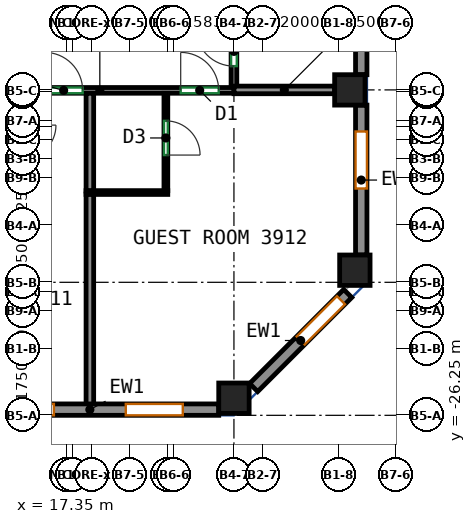
"""IFC4 building model, lengths in metres.
Left out: names, types, materials, properties, quantities, classifications, styles, units other than length and angle.
Written with IfcOpenShell. Run it as: python <this file> out.ifc"""

import sys

from ifc_helpers import new_model, si_unit, direction, frame, frame_2d, origin, origin_2d, place, context, subcontext, project, spatial, rectangle, extrude, source, transform, mapped, element, fill, save


model = new_model("IFC4")
c1 = context("Model", 3, precision=1e-05, world=origin(), true_north=direction((0.0, 1.0)))
c2 = subcontext(c1, "Body", "Model", "MODEL_VIEW")
j1 = project(units=[si_unit("LENGTHUNIT", "METRE"), si_unit("PLANEANGLEUNIT", "RADIAN")], contexts=[c1])
p1 = place(None, origin())
s1 = spatial("IfcSite", under=j1, at=p1, CompositionType="ELEMENT")
p2 = place(p1, origin())
s2 = spatial("IfcBuilding", under=s1, at=p2, CompositionType="ELEMENT")
p3 = place(p2, frame((0.0, 0.0, 168.5)))
s3 = spatial("IfcBuildingStorey", under=s2, at=p3, CompositionType="ELEMENT", Elevation=168.5)
m1 = source(origin(), c2, "Body", "SweptSolid", [
    extrude(rectangle(XDim=0.8, YDim=0.8, at=origin_2d()), origin(), (0.0, 0.0, 1.0), 3.12),
])
for number, where, z_axis, x_axis in (
    (1, (21.75, -25.8, 0.0), (0.0, 0.0, 1.0), (1.0, 0.0, 0.0)),
    (2, (24.8, -17.688, 0.0), (0.0, 0.0, 1.0), (1.0, 0.0, 0.0)),
    (3, (24.932, -22.432, 0.0), (0.0, 0.0, 1.0), (1.0, 0.0, 0.0)),
):
    element("IfcColumn", number, at=place(p3, frame(where, z_axis=z_axis, x_axis=x_axis)), inside=s3, PredefinedType="COLUMN", context=c2, shape_type="MappedRepresentation", body=[
        mapped(m1, transform((0.0, 0.0, 0.0))),
    ])
m2 = source(origin(), c2, "Body", "SweptSolid", [
    extrude(rectangle(XDim=6.783, YDim=0.3, at=frame_2d((3.392, 0.0))), origin(), (0.0, 0.0, 1.0), 3.12),
])
p4 = place(p3, frame((14.567, -26.1, 0.0), z_axis=(0.0, 0.0, 1.0), x_axis=(1.0, 0.0, 0.0)))
e4 = element("IfcWall", 4, at=p4, inside=s3, PredefinedType="SOLIDWALL", context=c2, shape_type="MappedRepresentation", body=[
    mapped(m2, transform((0.0, 0.0, 0.0))),
])
p5 = place(p4, frame((0.946, 0.0, 0.85)))
e5 = element("IfcOpeningElement", 5, at=p5, cuts=e4, PredefinedType="OPENING", context=c2, shape_type="SweptSolid", body=[
    extrude(rectangle(XDim=1.5, YDim=1.95, at=frame_2d((0.75, 0.975))), frame((0.0, 0.16, 0.0), z_axis=(0.0, -1.0, 0.0), x_axis=(1.0, 0.0, 0.0)), (0.0, 0.0, 1.0), 0.32),
])
p6 = place(p4, frame((4.337, 0.0, 0.85)))
e6 = element("IfcOpeningElement", 6, at=p6, cuts=e4, PredefinedType="OPENING", context=c2, shape_type="SweptSolid", body=[
    extrude(rectangle(XDim=1.5, YDim=1.95, at=frame_2d((0.75, 0.975))), frame((0.0, 0.16, 0.0), z_axis=(0.0, -1.0, 0.0), x_axis=(1.0, 0.0, 0.0)), (0.0, 0.0, 1.0), 0.32),
])
m3 = source(origin(), c2, "Body", "SweptSolid", [
    extrude(rectangle(XDim=3.5, YDim=0.3, at=frame_2d((1.75, 0.0))), origin(), (0.0, 0.0, 1.0), 3.12),
])
p7 = place(p3, frame((22.269, -25.519, 0.0), z_axis=(0.0, 0.0, 1.0), x_axis=(0.707141656123, 0.70707190453, 0.0)))
e7 = element("IfcWall", 7, at=p7, inside=s3, PredefinedType="SOLIDWALL", context=c2, shape_type="MappedRepresentation", body=[
    mapped(m3, transform((0.0, 0.0, 0.0))),
])
p8 = place(p7, frame((1.75, 0.0, 0.85)))
e8 = element("IfcOpeningElement", 8, at=p8, cuts=e7, PredefinedType="OPENING", context=c2, shape_type="SweptSolid", body=[
    extrude(rectangle(XDim=1.5, YDim=1.95, at=frame_2d((0.75, 0.975))), frame((0.0, 0.16, 0.0), z_axis=(0.0, -1.0, 0.0), x_axis=(1.0, 0.0, 0.0)), (0.0, 0.0, 1.0), 0.32),
])
m4 = source(origin(), c2, "Body", "SweptSolid", [
    extrude(rectangle(XDim=3.944, YDim=0.3, at=frame_2d((1.972, 0.0))), origin(), (0.0, 0.0, 1.0), 3.12),
])
p9 = place(p3, frame((25.1, -22.032, 0.0), z_axis=(0.0, 0.0, 1.0), x_axis=(0.0, 1.0, 0.0)))
e9 = element("IfcWall", 9, at=p9, inside=s3, PredefinedType="SOLIDWALL", context=c2, shape_type="MappedRepresentation", body=[
    mapped(m4, transform((0.0, 0.0, 0.0))),
])
p10 = place(p9, frame((1.75, 0.0, 0.85)))
e10 = element("IfcOpeningElement", 10, at=p10, cuts=e9, PredefinedType="OPENING", context=c2, shape_type="SweptSolid", body=[
    extrude(rectangle(XDim=1.5, YDim=1.95, at=frame_2d((0.75, 0.975))), frame((0.0, 0.16, 0.0), z_axis=(0.0, -1.0, 0.0), x_axis=(1.0, 0.0, 0.0)), (0.0, 0.0, 1.0), 0.32),
])
m5 = source(origin(), c2, "Body", "SweptSolid", [
    extrude(rectangle(XDim=7.763, YDim=0.3, at=frame_2d((3.881, 0.0))), origin(), (0.0, 0.0, 1.0), 3.12),
])
p11 = place(p3, frame((25.1, -17.288, 0.0), z_axis=(0.0, 0.0, 1.0), x_axis=(0.0, 1.0, 0.0)))
e11 = element("IfcWall", 11, at=p11, inside=s3, PredefinedType="SOLIDWALL", context=c2, shape_type="MappedRepresentation", body=[
    mapped(m5, transform((0.0, 0.0, 0.0))),
])
p12 = place(p11, frame((1.75, 0.0, 0.85)))
e12 = element("IfcOpeningElement", 12, at=p12, cuts=e11, PredefinedType="OPENING", context=c2, shape_type="SweptSolid", body=[
    extrude(rectangle(XDim=1.5, YDim=1.95, at=frame_2d((0.75, 0.975))), frame((0.0, 0.16, 0.0), z_axis=(0.0, -1.0, 0.0), x_axis=(1.0, 0.0, 0.0)), (0.0, 0.0, 1.0), 0.32),
])
p13 = place(p11, frame((5.631, 0.0, 0.85)))
e13 = element("IfcOpeningElement", 13, at=p13, cuts=e11, PredefinedType="OPENING", context=c2, shape_type="SweptSolid", body=[
    extrude(rectangle(XDim=1.5, YDim=1.95, at=frame_2d((0.75, 0.975))), frame((0.0, 0.16, 0.0), z_axis=(0.0, -1.0, 0.0), x_axis=(1.0, 0.0, 0.0)), (0.0, 0.0, 1.0), 0.32),
])
p14 = place(p3, frame((14.692, -17.7, 0.0), z_axis=(0.0, 0.0, 1.0), x_axis=(1.0, 0.0, 0.0)))
e14 = element("IfcWall", 14, at=p14, inside=s3, PredefinedType="PARTITIONING", context=c2, shape_type="SweptSolid", body=[
    extrude(rectangle(XDim=7.058, YDim=0.15, at=frame_2d((3.529, 0.0))), origin(), (0.0, 0.0, 1.0), 2.52),
])
p15 = place(p14, frame((2.077, 0.0, 0.0)))
e15 = element("IfcOpeningElement", 15, at=p15, cuts=e14, PredefinedType="OPENING", context=c2, shape_type="SweptSolid", body=[
    extrude(rectangle(XDim=1.0, YDim=2.1, at=frame_2d((0.5, 1.05))), frame((0.0, 0.085, 0.0), z_axis=(0.0, -1.0, 0.0), x_axis=(1.0, 0.0, 0.0)), (0.0, 0.0, 1.0), 0.17),
])
p16 = place(p14, frame((5.657, 0.0, 0.0)))
e16 = element("IfcOpeningElement", 16, at=p16, cuts=e14, PredefinedType="OPENING", context=c2, shape_type="SweptSolid", body=[
    extrude(rectangle(XDim=1.0, YDim=2.1, at=frame_2d((0.5, 1.05))), frame((0.0, 0.085, 0.0), z_axis=(0.0, -1.0, 0.0), x_axis=(1.0, 0.0, 0.0)), (0.0, 0.0, 1.0), 0.17),
])
p17 = place(p3, frame((21.75, -17.598, 0.0), z_axis=(0.0, 0.0, 1.0), x_axis=(0.0, 1.0, 0.0)))
e17 = element("IfcWall", 17, at=p17, inside=s3, PredefinedType="PARTITIONING", context=c2, shape_type="SweptSolid", body=[
    extrude(rectangle(XDim=1.848, YDim=0.15, at=frame_2d((0.924, 0.0))), origin(), (0.0, 0.0, 1.0), 3.12),
])
p18 = place(p17, frame((0.536, 0.0, 0.0)))
e18 = element("IfcOpeningElement", 18, at=p18, cuts=e17, PredefinedType="OPENING", context=c2, shape_type="SweptSolid", body=[
    extrude(rectangle(XDim=1.0, YDim=2.1, at=frame_2d((0.5, 1.05))), frame((0.0, 0.085, 0.0), z_axis=(0.0, -1.0, 0.0), x_axis=(1.0, 0.0, 0.0)), (0.0, 0.0, 1.0), 0.17),
])
p19 = place(p3, frame((17.959, -26.0, 0.0), z_axis=(0.0, 0.0, 1.0), x_axis=(0.0, 1.0, 0.0)))
e19 = element("IfcWall", 19, at=p19, inside=s3, PredefinedType="PARTITIONING", context=c2, shape_type="SweptSolid", body=[
    extrude(rectangle(XDim=5.572, YDim=0.2, at=frame_2d((2.786, 0.0))), origin(), (0.0, 0.0, 1.0), 3.12),
])
p20 = place(p3, frame((17.959, -20.348, 0.0), z_axis=(0.0, 0.0, 1.0), x_axis=(0.0, 1.0, 0.0)))
e20 = element("IfcWall", 20, at=p20, inside=s3, PredefinedType="PARTITIONING", context=c2, shape_type="SweptSolid", body=[
    extrude(rectangle(XDim=2.571, YDim=0.2, at=frame_2d((1.285, 0.0))), origin(), (0.0, 0.0, 1.0), 3.12),
])
p21 = place(p3, frame((17.859, -20.388, 0.0), z_axis=(0.0, 0.0, 1.0), x_axis=(1.0, 0.0, 0.0)))
e21 = element("IfcWall", 21, at=p21, inside=s3, PredefinedType="PARTITIONING", context=c2, shape_type="SweptSolid", body=[
    extrude(rectangle(XDim=2.15, YDim=0.1, at=frame_2d((1.075, 0.0))), origin(), (0.0, 0.0, 1.0), 3.12),
])
p22 = place(p3, frame((19.959, -17.777, 0.0), z_axis=(0.0, 0.0, 1.0), x_axis=(0.0, -1.0, 0.0)))
e22 = element("IfcWall", 22, at=p22, inside=s3, PredefinedType="PARTITIONING", context=c2, shape_type="SweptSolid", body=[
    extrude(rectangle(XDim=2.561, YDim=0.1, at=frame_2d((1.28, 0.0))), origin(), (0.0, 0.0, 1.0), 3.12),
])
p23 = place(p22, frame((0.725, 0.0, 0.0)))
e23 = element("IfcOpeningElement", 23, at=p23, cuts=e22, PredefinedType="OPENING", context=c2, shape_type="SweptSolid", body=[
    extrude(rectangle(XDim=0.9, YDim=2.1, at=frame_2d((0.45, 1.05))), frame((0.0, 0.06, 0.0), z_axis=(0.0, -1.0, 0.0), x_axis=(1.0, 0.0, 0.0)), (0.0, 0.0, 1.0), 0.12),
])
p24 = place(p3, frame((21.752, -17.688, 0.0), z_axis=(0.0, 0.0, 1.0), x_axis=(1.0, 0.0, 0.0)))
e24 = element("IfcWall", 24, at=p24, inside=s3, PredefinedType="PARTITIONING", context=c2, shape_type="SweptSolid", body=[
    extrude(rectangle(XDim=2.648, YDim=0.2, at=frame_2d((1.324, 0.0))), origin(), (0.0, 0.0, 1.0), 2.52),
])
p25 = place(p5, origin())
e25 = element("IfcWindow", 25, at=p25, inside=s3, PartitioningType="SINGLE_PANEL", PredefinedType="WINDOW", context=c2, shape_type="SweptSolid", body=[
    extrude(rectangle(XDim=1.5, YDim=1.95, at=frame_2d((0.75, 0.975))), frame((0.0, 0.03, 0.0), z_axis=(0.0, -1.0, 0.0), x_axis=(1.0, 0.0, 0.0)), (0.0, 0.0, 1.0), 0.06),
])
fill(e5, e25)
p26 = place(p6, origin())
e26 = element("IfcWindow", 26, at=p26, inside=s3, PartitioningType="SINGLE_PANEL", PredefinedType="WINDOW", context=c2, shape_type="SweptSolid", body=[
    extrude(rectangle(XDim=1.5, YDim=1.95, at=frame_2d((0.75, 0.975))), frame((0.0, 0.03, 0.0), z_axis=(0.0, -1.0, 0.0), x_axis=(1.0, 0.0, 0.0)), (0.0, 0.0, 1.0), 0.06),
])
fill(e6, e26)
p27 = place(p8, origin())
e27 = element("IfcWindow", 27, at=p27, inside=s3, PartitioningType="SINGLE_PANEL", PredefinedType="WINDOW", context=c2, shape_type="SweptSolid", body=[
    extrude(rectangle(XDim=1.5, YDim=1.95, at=frame_2d((0.75, 0.975))), frame((0.0, 0.03, 0.0), z_axis=(0.0, -1.0, 0.0), x_axis=(1.0, 0.0, 0.0)), (0.0, 0.0, 1.0), 0.06),
])
fill(e8, e27)
p28 = place(p10, origin())
e28 = element("IfcWindow", 28, at=p28, inside=s3, PartitioningType="SINGLE_PANEL", PredefinedType="WINDOW", context=c2, shape_type="SweptSolid", body=[
    extrude(rectangle(XDim=1.5, YDim=1.95, at=frame_2d((0.75, 0.975))), frame((0.0, 0.03, 0.0), z_axis=(0.0, -1.0, 0.0), x_axis=(1.0, 0.0, 0.0)), (0.0, 0.0, 1.0), 0.06),
])
fill(e10, e28)
p29 = place(p23, origin())
e29 = element("IfcDoor", 29, at=p29, inside=s3, OperationType="SINGLE_SWING_RIGHT", PredefinedType="DOOR", context=c2, shape_type="SweptSolid", body=[
    extrude(rectangle(XDim=0.9, YDim=2.1, at=frame_2d((0.45, 1.05))), frame((0.0, 0.025, 0.0), z_axis=(0.0, -1.0, 0.0), x_axis=(1.0, 0.0, 0.0)), (0.0, 0.0, 1.0), 0.05),
])
fill(e23, e29)
p30 = place(p15, origin())
e30 = element("IfcDoor", 30, at=p30, inside=s3, OperationType="SINGLE_SWING_LEFT", PredefinedType="DOOR", context=c2, shape_type="SweptSolid", body=[
    extrude(rectangle(XDim=1.0, YDim=2.1, at=frame_2d((0.5, 1.05))), frame((0.0, 0.025, 0.0), z_axis=(0.0, -1.0, 0.0), x_axis=(1.0, 0.0, 0.0)), (0.0, 0.0, 1.0), 0.05),
])
fill(e15, e30)
p31 = place(p16, origin())
e31 = element("IfcDoor", 31, at=p31, inside=s3, OperationType="SINGLE_SWING_LEFT", PredefinedType="DOOR", context=c2, shape_type="SweptSolid", body=[
    extrude(rectangle(XDim=1.0, YDim=2.1, at=frame_2d((0.5, 1.05))), frame((0.0, 0.025, 0.0), z_axis=(0.0, -1.0, 0.0), x_axis=(1.0, 0.0, 0.0)), (0.0, 0.0, 1.0), 0.05),
])
fill(e16, e31)
p32 = place(p18, origin())
e32 = element("IfcDoor", 32, at=p32, inside=s3, OperationType="SINGLE_SWING_RIGHT", PredefinedType="DOOR", context=c2, shape_type="SweptSolid", body=[
    extrude(rectangle(XDim=1.0, YDim=2.1, at=frame_2d((0.5, 1.05))), frame((0.0, 0.025, 0.0), z_axis=(0.0, -1.0, 0.0), x_axis=(1.0, 0.0, 0.0)), (0.0, 0.0, 1.0), 0.05),
])
fill(e18, e32)
save(model, sys.argv[1])
